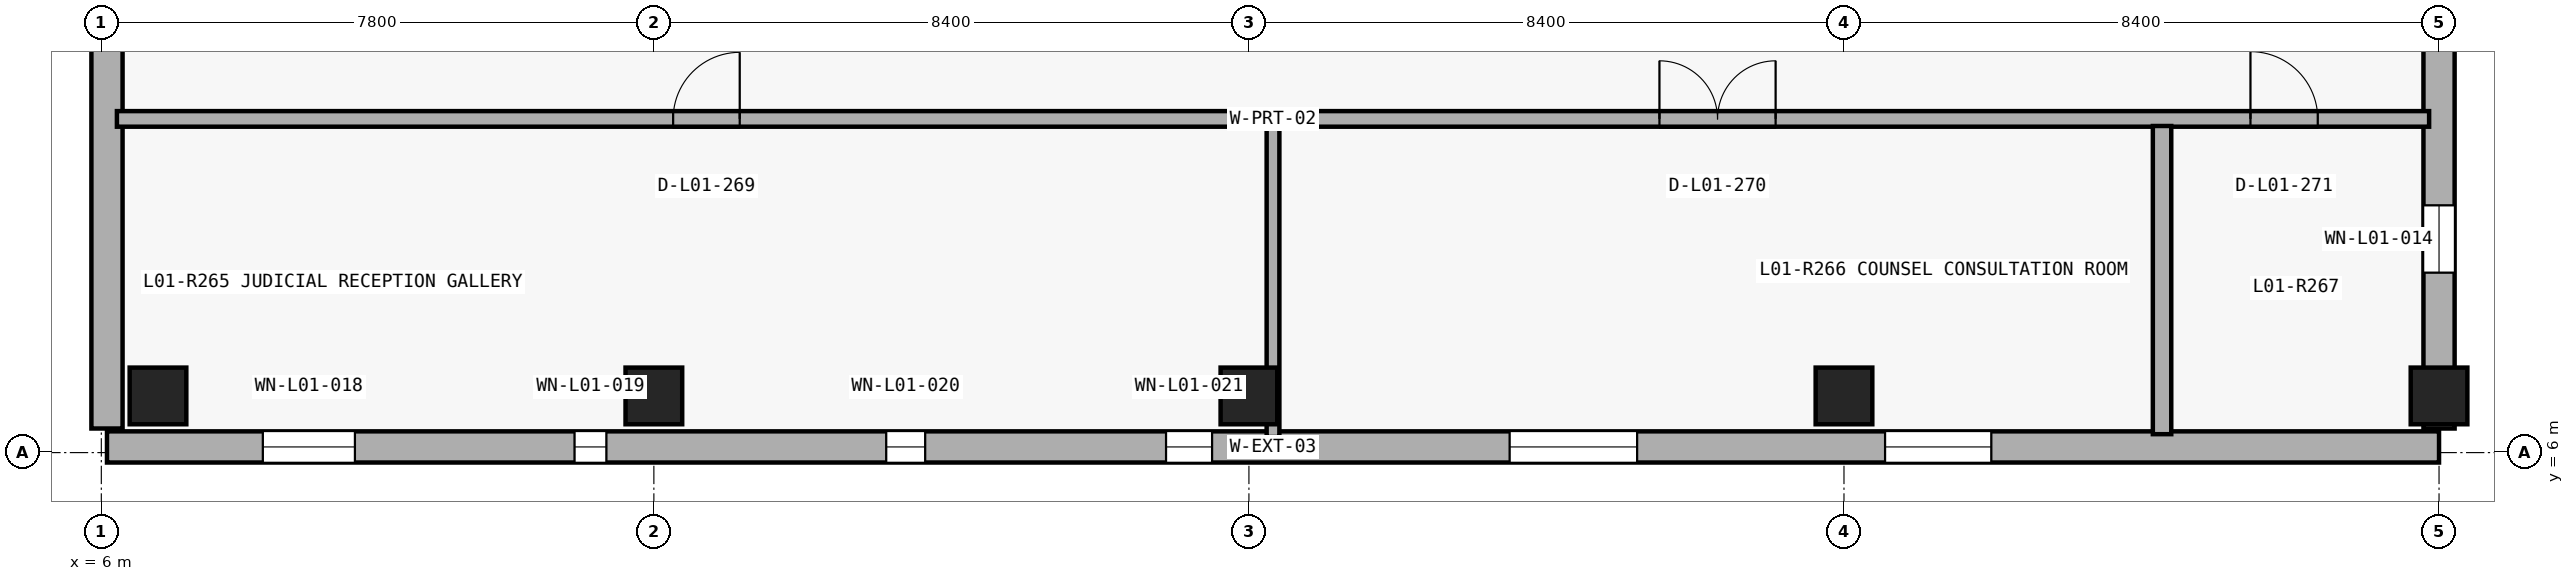
"""IFC4 building model, lengths in metres.
Left out: names, types, materials, properties, quantities, classifications, styles, units other than length and angle.
Written with IfcOpenShell. Run it as: python <this file> out.ifc"""

import sys

from ifc_helpers import new_model, si_unit, direction, frame, frame_2d, origin_with_axes, origin_2d_with_axis, place, context, subcontext, project, spatial, rectangle, circle, extrude, element, fill, save


model = new_model("IFC4")
c1 = context("Model", 3, precision=1e-05, world=origin_with_axes(), true_north=direction((0.0, 1.0)))
c2 = subcontext(c1, "Body", "Model", "MODEL_VIEW")
j1 = project(units=[si_unit("LENGTHUNIT", "METRE"), si_unit("PLANEANGLEUNIT", "RADIAN")], contexts=[c1])
p1 = place(None, origin_with_axes())
s1 = spatial("IfcSite", under=j1, at=p1, CompositionType="ELEMENT")
p2 = place(p1, origin_with_axes())
s2 = spatial("IfcBuilding", under=s1, at=p2, CompositionType="ELEMENT")
p3 = place(p2, frame((0.0, 0.0, 5.4), z_axis=(0.0, 0.0, 1.0), x_axis=(1.0, 0.0, 0.0)))
s3 = spatial("IfcBuildingStorey", under=s2, at=p3, CompositionType="ELEMENT", Elevation=5.4)
p4 = place(None, frame((6.08, 6.08, 5.4), z_axis=(0.0, 0.0, 1.0), x_axis=(1.0, 0.0, 0.0)))
e1 = element("IfcWall", 1, at=p4, inside=s3, PredefinedType="SOLIDWALL", context=c2, shape_type="SweptSolid", body=[
    extrude(rectangle(XDim=32.92, YDim=0.44, at=frame_2d((16.46, 0.0), x_axis=(1.0, 0.0))), origin_with_axes(), (0.0, 0.0, 1.0), 5.1),
])
p5 = place(None, frame((8.93, 6.08, 6.3), z_axis=(0.0, 0.0, 1.0), x_axis=(1.0, 0.0, 0.0)))
e2 = element("IfcOpeningElement", 2, at=p5, cuts=e1, PredefinedType="OPENING", context=c2, shape_type="SweptSolid", body=[
    extrude(rectangle(XDim=1.3, YDim=2.25, at=frame_2d((0.0, 1.125), x_axis=(1.0, 0.0))), frame((0.0, 0.23, 0.0), z_axis=(0.0, -1.0, 0.0), x_axis=(1.0, 0.0, 0.0)), (0.0, 0.0, 1.0), 0.46),
])
p6 = place(None, frame((12.905, 6.08, 7.05), z_axis=(0.0, 0.0, 1.0), x_axis=(1.0, 0.0, 0.0)))
e3 = element("IfcOpeningElement", 3, at=p6, cuts=e1, PredefinedType="OPENING", context=c2, shape_type="SweptSolid", body=[
    extrude(rectangle(XDim=0.45, YDim=1.8, at=frame_2d((0.0, 0.9), x_axis=(1.0, 0.0))), frame((0.0, 0.23, 0.0), z_axis=(0.0, -1.0, 0.0), x_axis=(1.0, 0.0, 0.0)), (0.0, 0.0, 1.0), 0.46),
])
p7 = place(None, frame((17.355, 6.08, 7.15), z_axis=(0.0, 0.0, 1.0), x_axis=(1.0, 0.0, 0.0)))
e4 = element("IfcOpeningElement", 4, at=p7, cuts=e1, PredefinedType="OPENING", context=c2, shape_type="SweptSolid", body=[
    extrude(rectangle(XDim=0.55, YDim=1.6, at=frame_2d((0.0, 0.8), x_axis=(1.0, 0.0))), frame((0.0, 0.23, 0.0), z_axis=(0.0, -1.0, 0.0), x_axis=(1.0, 0.0, 0.0)), (0.0, 0.0, 1.0), 0.46),
])
p8 = place(None, frame((21.355, 6.08, 7.2), z_axis=(0.0, 0.0, 1.0), x_axis=(1.0, 0.0, 0.0)))
e5 = element("IfcOpeningElement", 5, at=p8, cuts=e1, PredefinedType="OPENING", context=c2, shape_type="SweptSolid", body=[
    extrude(rectangle(XDim=0.65, YDim=1.45, at=frame_2d((0.0, 0.725), x_axis=(1.0, 0.0))), frame((0.0, 0.23, 0.0), z_axis=(0.0, -1.0, 0.0), x_axis=(1.0, 0.0, 0.0)), (0.0, 0.0, 1.0), 0.46),
])
p9 = place(None, frame((26.78, 6.08, 6.2), z_axis=(0.0, 0.0, 1.0), x_axis=(1.0, 0.0, 0.0)))
e6 = element("IfcOpeningElement", 6, at=p9, cuts=e1, PredefinedType="OPENING", context=c2, shape_type="SweptSolid", body=[
    extrude(rectangle(XDim=1.8, YDim=4.2, at=frame_2d((0.0, 2.1), x_axis=(1.0, 0.0))), frame((0.0, 0.23, 0.0), z_axis=(0.0, -1.0, 0.0), x_axis=(1.0, 0.0, 0.0)), (0.0, 0.0, 1.0), 0.46),
])
p10 = place(None, frame((31.93, 6.08, 6.4), z_axis=(0.0, 0.0, 1.0), x_axis=(1.0, 0.0, 0.0)))
e7 = element("IfcOpeningElement", 7, at=p10, cuts=e1, PredefinedType="OPENING", context=c2, shape_type="SweptSolid", body=[
    extrude(rectangle(XDim=1.5, YDim=3.8, at=frame_2d((0.0, 1.9), x_axis=(1.0, 0.0))), frame((0.0, 0.23, 0.0), z_axis=(0.0, -1.0, 0.0), x_axis=(1.0, 0.0, 0.0)), (0.0, 0.0, 1.0), 0.46),
])
p11 = place(None, frame((39.0, 6.34, 5.4), z_axis=(0.0, 0.0, 1.0), x_axis=(0.0, 1.0, 0.0)))
e8 = element("IfcWall", 8, at=p11, inside=s3, PredefinedType="SOLIDWALL", context=c2, shape_type="SweptSolid", body=[
    extrude(rectangle(XDim=23.95, YDim=0.44, at=frame_2d((11.975, 0.0), x_axis=(1.0, 0.0))), origin_with_axes(), (0.0, 0.0, 1.0), 5.1),
])
p12 = place(None, frame((39.0, 9.015, 6.35), z_axis=(0.0, 0.0, 1.0), x_axis=(0.0, 1.0, 0.0)))
e9 = element("IfcOpeningElement", 9, at=p12, cuts=e8, PredefinedType="OPENING", context=c2, shape_type="SweptSolid", body=[
    extrude(rectangle(XDim=0.95, YDim=1.95, at=frame_2d((0.0, 0.975), x_axis=(1.0, 0.0))), frame((0.0, 0.23, 0.0), z_axis=(0.0, -1.0, 0.0), x_axis=(1.0, 0.0, 0.0)), (0.0, 0.0, 1.0), 0.46),
])
p13 = place(None, frame((39.0, 15.19, 6.25), z_axis=(0.0, 0.0, 1.0), x_axis=(0.0, 1.0, 0.0)))
e10 = element("IfcOpeningElement", 10, at=p13, cuts=e8, PredefinedType="OPENING", context=c2, shape_type="SweptSolid", body=[
    extrude(rectangle(XDim=1.6, YDim=3.1, at=frame_2d((0.0, 1.55), x_axis=(1.0, 0.0))), frame((0.0, 0.23, 0.0), z_axis=(0.0, -1.0, 0.0), x_axis=(1.0, 0.0, 0.0)), (0.0, 0.0, 1.0), 0.46),
])
p14 = place(None, frame((39.0, 18.065, 6.3), z_axis=(0.0, 0.0, 1.0), x_axis=(0.0, 1.0, 0.0)))
e11 = element("IfcOpeningElement", 11, at=p14, cuts=e8, PredefinedType="OPENING", context=c2, shape_type="SweptSolid", body=[
    extrude(rectangle(XDim=1.45, YDim=2.85, at=frame_2d((0.0, 1.425), x_axis=(1.0, 0.0))), frame((0.0, 0.23, 0.0), z_axis=(0.0, -1.0, 0.0), x_axis=(1.0, 0.0, 0.0)), (0.0, 0.0, 1.0), 0.46),
])
p15 = place(None, frame((39.0, 24.015, 6.3), z_axis=(0.0, 0.0, 1.0), x_axis=(0.0, 1.0, 0.0)))
e12 = element("IfcOpeningElement", 12, at=p15, cuts=e8, PredefinedType="OPENING", context=c2, shape_type="SweptSolid", body=[
    extrude(rectangle(XDim=1.65, YDim=2.4, at=frame_2d((0.0, 1.2), x_axis=(1.0, 0.0))), frame((0.0, 0.23, 0.0), z_axis=(0.0, -1.0, 0.0), x_axis=(1.0, 0.0, 0.0)), (0.0, 0.0, 1.0), 0.46),
])
p16 = place(None, frame((6.08, 30.34, 5.4), z_axis=(0.0, 0.0, 1.0), x_axis=(0.0, -1.0, 0.0)))
e13 = element("IfcWall", 13, at=p16, inside=s3, PredefinedType="SOLIDWALL", context=c2, shape_type="SweptSolid", body=[
    extrude(rectangle(XDim=24.0, YDim=0.44, at=frame_2d((12.0, 0.0), x_axis=(1.0, 0.0))), origin_with_axes(), (0.0, 0.0, 1.0), 5.1),
])
p17 = place(None, frame((6.08, 27.54, 6.5), z_axis=(0.0, 0.0, 1.0), x_axis=(0.0, -1.0, 0.0)))
e14 = element("IfcOpeningElement", 14, at=p17, cuts=e13, PredefinedType="OPENING", context=c2, shape_type="SweptSolid", body=[
    extrude(rectangle(XDim=1.2, YDim=3.4, at=frame_2d((0.0, 1.7), x_axis=(1.0, 0.0))), frame((0.0, 0.23, 0.0), z_axis=(0.0, -1.0, 0.0), x_axis=(1.0, 0.0, 0.0)), (0.0, 0.0, 1.0), 0.46),
])
p18 = place(None, frame((6.08, 24.14, 6.25), z_axis=(0.0, 0.0, 1.0), x_axis=(0.0, -1.0, 0.0)))
e15 = element("IfcOpeningElement", 15, at=p18, cuts=e13, PredefinedType="OPENING", context=c2, shape_type="SweptSolid", body=[
    extrude(rectangle(XDim=2.1, YDim=3.3, at=frame_2d((0.0, 1.65), x_axis=(1.0, 0.0))), frame((0.0, 0.23, 0.0), z_axis=(0.0, -1.0, 0.0), x_axis=(1.0, 0.0, 0.0)), (0.0, 0.0, 1.0), 0.46),
])
p19 = place(None, frame((6.08, 18.44, 6.3), z_axis=(0.0, 0.0, 1.0), x_axis=(0.0, -1.0, 0.0)))
e16 = element("IfcOpeningElement", 16, at=p19, cuts=e13, PredefinedType="OPENING", context=c2, shape_type="SweptSolid", body=[
    extrude(rectangle(XDim=1.8, YDim=3.0, at=frame_2d((0.0, 1.5), x_axis=(1.0, 0.0))), frame((0.0, 0.23, 0.0), z_axis=(0.0, -1.0, 0.0), x_axis=(1.0, 0.0, 0.0)), (0.0, 0.0, 1.0), 0.46),
])
p20 = place(None, frame((6.08, 15.09, 6.3), z_axis=(0.0, 0.0, 1.0), x_axis=(0.0, -1.0, 0.0)))
e17 = element("IfcOpeningElement", 17, at=p20, cuts=e13, PredefinedType="OPENING", context=c2, shape_type="SweptSolid", body=[
    extrude(rectangle(XDim=1.5, YDim=2.7, at=frame_2d((0.0, 1.35), x_axis=(1.0, 0.0))), frame((0.0, 0.23, 0.0), z_axis=(0.0, -1.0, 0.0), x_axis=(1.0, 0.0, 0.0)), (0.0, 0.0, 1.0), 0.46),
])
p21 = place(None, frame((6.22, 10.71, 5.4), z_axis=(0.0, 0.0, 1.0), x_axis=(1.0, 0.0, 0.0)))
e18 = element("IfcWall", 18, at=p21, inside=s3, PredefinedType="PARTITIONING", context=c2, shape_type="SweptSolid", body=[
    extrude(rectangle(XDim=32.64, YDim=0.22, at=frame_2d((16.32, 0.0), x_axis=(1.0, 0.0))), origin_with_axes(), (0.0, 0.0, 1.0), 5.08),
])
p22 = place(None, frame((14.542, 10.71, 5.4), z_axis=(0.0, 0.0, 1.0), x_axis=(1.0, 0.0, 0.0)))
e19 = element("IfcOpeningElement", 19, at=p22, cuts=e18, PredefinedType="OPENING", context=c2, shape_type="SweptSolid", body=[
    extrude(rectangle(XDim=0.94, YDim=2.3, at=frame_2d((0.0, 1.15), x_axis=(1.0, 0.0))), frame((0.0, 0.12, 0.0), z_axis=(0.0, -1.0, 0.0), x_axis=(1.0, 0.0, 0.0)), (0.0, 0.0, 1.0), 0.24),
])
p23 = place(None, frame((28.815, 10.71, 5.4), z_axis=(0.0, 0.0, 1.0), x_axis=(1.0, 0.0, 0.0)))
e20 = element("IfcOpeningElement", 20, at=p23, cuts=e18, PredefinedType="OPENING", context=c2, shape_type="SweptSolid", body=[
    extrude(rectangle(XDim=1.64, YDim=2.42, at=frame_2d((0.0, 1.21), x_axis=(1.0, 0.0))), frame((0.0, 0.12, 0.0), z_axis=(0.0, -1.0, 0.0), x_axis=(1.0, 0.0, 0.0)), (0.0, 0.0, 1.0), 0.24),
])
p24 = place(None, frame((36.813, 10.71, 5.4), z_axis=(0.0, 0.0, 1.0), x_axis=(1.0, 0.0, 0.0)))
e21 = element("IfcOpeningElement", 21, at=p24, cuts=e18, PredefinedType="OPENING", context=c2, shape_type="SweptSolid", body=[
    extrude(rectangle(XDim=0.95, YDim=2.1, at=frame_2d((0.0, 1.05), x_axis=(1.0, 0.0))), frame((0.0, 0.12, 0.0), z_axis=(0.0, -1.0, 0.0), x_axis=(1.0, 0.0, 0.0)), (0.0, 0.0, 1.0), 0.24),
])
p25 = place(None, frame((35.09, 6.26, 5.4), z_axis=(0.0, 0.0, 1.0), x_axis=(0.0, 1.0, 0.0)))
e22 = element("IfcWall", 22, at=p25, inside=s3, PredefinedType="PLUMBINGWALL", context=c2, shape_type="SweptSolid", body=[
    extrude(rectangle(XDim=4.35, YDim=0.26, at=frame_2d((2.175, 0.0), x_axis=(1.0, 0.0))), origin_with_axes(), (0.0, 0.0, 1.0), 5.08),
])
p26 = place(None, frame((22.54, 6.22, 5.4), z_axis=(0.0, 0.0, 1.0), x_axis=(0.0, 1.0, 0.0)))
e23 = element("IfcWall", 23, at=p26, inside=s3, PredefinedType="PARTITIONING", context=c2, shape_type="SweptSolid", body=[
    extrude(rectangle(XDim=4.49, YDim=0.18, at=frame_2d((2.245, 0.0), x_axis=(1.0, 0.0))), origin_with_axes(), (0.0, 0.0, 1.0), 5.08),
])
for number, where, z_axis, x_axis in (
    (24, (6.8, 6.8, 5.4), (0.0, 0.0, 1.0), (1.0, 0.0, 0.0)),
    (25, (13.8, 6.8, 5.4), (0.0, 0.0, 1.0), (1.0, 0.0, 0.0)),
    (26, (22.2, 6.8, 5.4), (0.0, 0.0, 1.0), (1.0, 0.0, 0.0)),
    (27, (30.6, 6.8, 5.4), (0.0, 0.0, 1.0), (1.0, 0.0, 0.0)),
    (28, (39.0, 6.8, 5.4), (0.0, 0.0, 1.0), (1.0, 0.0, 0.0)),
):
    element("IfcColumn", number, at=place(None, frame(where, z_axis=z_axis, x_axis=x_axis)), inside=s3, PredefinedType="COLUMN", context=c2, shape_type="SweptSolid", body=[
        extrude(circle(Radius=0.4, at=origin_2d_with_axis()), origin_with_axes(), (0.0, 0.0, 1.0), 5.4),
    ])
p27 = place(None, frame((14.542, 10.71, 5.4), z_axis=(0.0, 0.0, 1.0), x_axis=(1.0, 0.0, 0.0)))
e29 = element("IfcDoor", 29, at=p27, inside=s3, OperationType="SINGLE_SWING_RIGHT", PredefinedType="DOOR", context=c2, shape_type="SweptSolid", body=[
    extrude(rectangle(XDim=0.94, YDim=2.3, at=frame_2d((0.0, 1.15), x_axis=(1.0, 0.0))), frame((0.0, 0.04, 0.0), z_axis=(0.0, -1.0, 0.0), x_axis=(1.0, 0.0, 0.0)), (0.0, 0.0, 1.0), 0.08),
])
fill(e19, e29)
p28 = place(None, frame((28.815, 10.71, 5.4), z_axis=(0.0, 0.0, 1.0), x_axis=(1.0, 0.0, 0.0)))
e30 = element("IfcDoor", 30, at=p28, inside=s3, OperationType="DOUBLE_DOOR_SINGLE_SWING", PredefinedType="DOOR", context=c2, shape_type="SweptSolid", body=[
    extrude(rectangle(XDim=1.64, YDim=2.42, at=frame_2d((0.0, 1.21), x_axis=(1.0, 0.0))), frame((0.0, 0.04, 0.0), z_axis=(0.0, -1.0, 0.0), x_axis=(1.0, 0.0, 0.0)), (0.0, 0.0, 1.0), 0.08),
])
fill(e20, e30)
p29 = place(None, frame((36.813, 10.71, 5.4), z_axis=(0.0, 0.0, 1.0), x_axis=(1.0, 0.0, 0.0)))
e31 = element("IfcDoor", 31, at=p29, inside=s3, OperationType="SINGLE_SWING_LEFT", PredefinedType="DOOR", context=c2, shape_type="SweptSolid", body=[
    extrude(rectangle(XDim=0.95, YDim=2.1, at=frame_2d((0.0, 1.05), x_axis=(1.0, 0.0))), frame((0.0, 0.04, 0.0), z_axis=(0.0, -1.0, 0.0), x_axis=(1.0, 0.0, 0.0)), (0.0, 0.0, 1.0), 0.08),
])
fill(e21, e31)
p30 = place(None, frame((39.0, 9.015, 6.35), z_axis=(0.0, 0.0, 1.0), x_axis=(0.0, 1.0, 0.0)))
e32 = element("IfcWindow", 32, at=p30, inside=s3, PartitioningType="SINGLE_PANEL", PredefinedType="WINDOW", context=c2, shape_type="SweptSolid", body=[
    extrude(rectangle(XDim=0.95, YDim=1.95, at=frame_2d((0.0, 0.975), x_axis=(1.0, 0.0))), frame((0.0, 0.03, 0.0), z_axis=(0.0, -1.0, 0.0), x_axis=(1.0, 0.0, 0.0)), (0.0, 0.0, 1.0), 0.06),
])
fill(e9, e32)
p31 = place(None, frame((8.93, 6.08, 6.3), z_axis=(0.0, 0.0, 1.0), x_axis=(1.0, 0.0, 0.0)))
e33 = element("IfcWindow", 33, at=p31, inside=s3, PartitioningType="SINGLE_PANEL", PredefinedType="WINDOW", context=c2, shape_type="SweptSolid", body=[
    extrude(rectangle(XDim=1.3, YDim=2.25, at=frame_2d((0.0, 1.125), x_axis=(1.0, 0.0))), frame((0.0, 0.03, 0.0), z_axis=(0.0, -1.0, 0.0), x_axis=(1.0, 0.0, 0.0)), (0.0, 0.0, 1.0), 0.06),
])
fill(e2, e33)
p32 = place(None, frame((12.905, 6.08, 7.05), z_axis=(0.0, 0.0, 1.0), x_axis=(1.0, 0.0, 0.0)))
e34 = element("IfcWindow", 34, at=p32, inside=s3, PartitioningType="SINGLE_PANEL", PredefinedType="WINDOW", context=c2, shape_type="SweptSolid", body=[
    extrude(rectangle(XDim=0.45, YDim=1.8, at=frame_2d((0.0, 0.9), x_axis=(1.0, 0.0))), frame((0.0, 0.03, 0.0), z_axis=(0.0, -1.0, 0.0), x_axis=(1.0, 0.0, 0.0)), (0.0, 0.0, 1.0), 0.06),
])
fill(e3, e34)
p33 = place(None, frame((17.355, 6.08, 7.15), z_axis=(0.0, 0.0, 1.0), x_axis=(1.0, 0.0, 0.0)))
e35 = element("IfcWindow", 35, at=p33, inside=s3, PartitioningType="SINGLE_PANEL", PredefinedType="WINDOW", context=c2, shape_type="SweptSolid", body=[
    extrude(rectangle(XDim=0.55, YDim=1.6, at=frame_2d((0.0, 0.8), x_axis=(1.0, 0.0))), frame((0.0, 0.03, 0.0), z_axis=(0.0, -1.0, 0.0), x_axis=(1.0, 0.0, 0.0)), (0.0, 0.0, 1.0), 0.06),
])
fill(e4, e35)
p34 = place(None, frame((21.355, 6.08, 7.2), z_axis=(0.0, 0.0, 1.0), x_axis=(1.0, 0.0, 0.0)))
e36 = element("IfcWindow", 36, at=p34, inside=s3, PartitioningType="SINGLE_PANEL", PredefinedType="WINDOW", context=c2, shape_type="SweptSolid", body=[
    extrude(rectangle(XDim=0.65, YDim=1.45, at=frame_2d((0.0, 0.725), x_axis=(1.0, 0.0))), frame((0.0, 0.03, 0.0), z_axis=(0.0, -1.0, 0.0), x_axis=(1.0, 0.0, 0.0)), (0.0, 0.0, 1.0), 0.06),
])
fill(e5, e36)
p35 = place(None, frame((26.78, 6.08, 6.2), z_axis=(0.0, 0.0, 1.0), x_axis=(1.0, 0.0, 0.0)))
e37 = element("IfcWindow", 37, at=p35, inside=s3, PartitioningType="SINGLE_PANEL", PredefinedType="WINDOW", context=c2, shape_type="SweptSolid", body=[
    extrude(rectangle(XDim=1.8, YDim=4.2, at=frame_2d((0.0, 2.1), x_axis=(1.0, 0.0))), frame((0.0, 0.03, 0.0), z_axis=(0.0, -1.0, 0.0), x_axis=(1.0, 0.0, 0.0)), (0.0, 0.0, 1.0), 0.06),
])
fill(e6, e37)
p36 = place(None, frame((31.93, 6.08, 6.4), z_axis=(0.0, 0.0, 1.0), x_axis=(1.0, 0.0, 0.0)))
e38 = element("IfcWindow", 38, at=p36, inside=s3, PartitioningType="SINGLE_PANEL", PredefinedType="WINDOW", context=c2, shape_type="SweptSolid", body=[
    extrude(rectangle(XDim=1.5, YDim=3.8, at=frame_2d((0.0, 1.9), x_axis=(1.0, 0.0))), frame((0.0, 0.03, 0.0), z_axis=(0.0, -1.0, 0.0), x_axis=(1.0, 0.0, 0.0)), (0.0, 0.0, 1.0), 0.06),
])
fill(e7, e38)
save(model, sys.argv[1])
